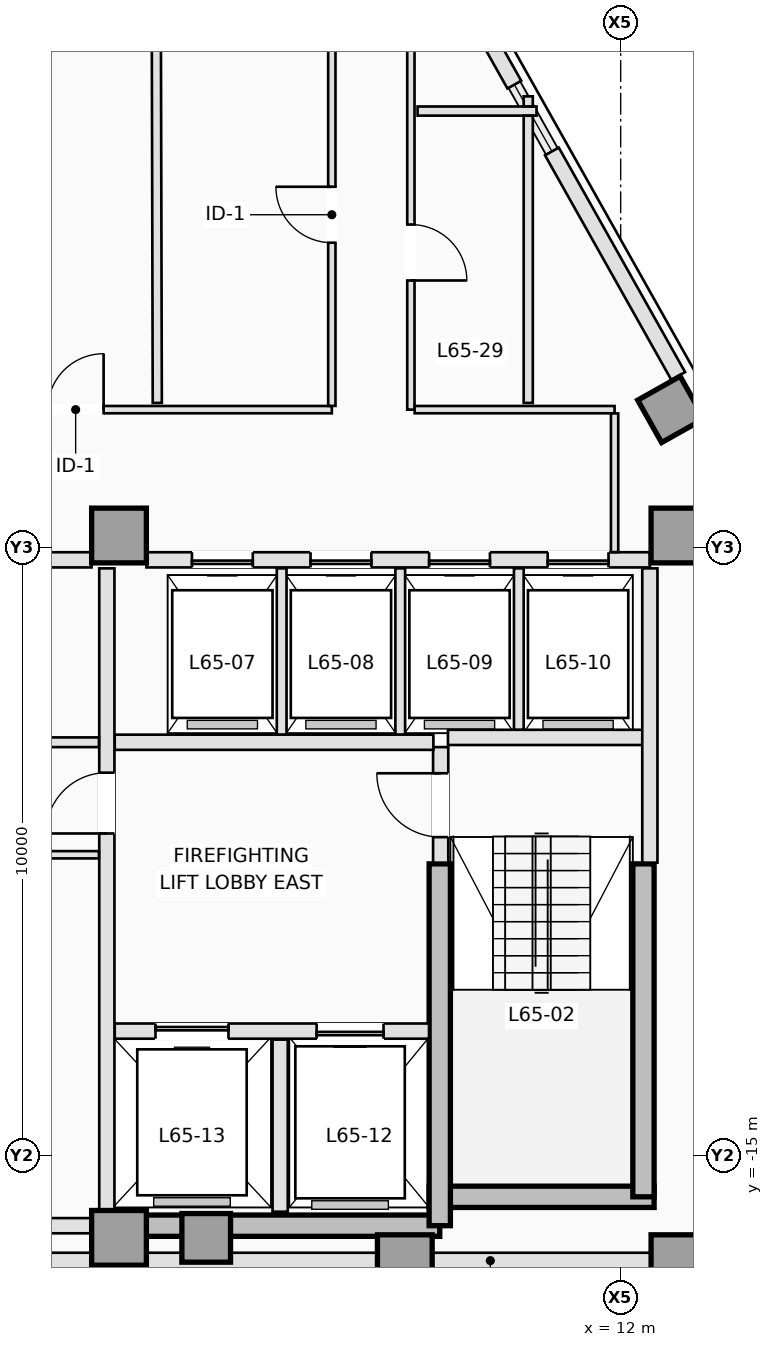
"""IFC4 building model, lengths in metres.
Left out: names, types, materials, properties, quantities, classifications, styles, units other than length and angle.
Written with IfcOpenShell. Run it as: python <this file> out.ifc"""

import sys

from ifc_helpers import new_model, si_unit, direction, frame, frame_2d, origin, origin_2d, place, context, subcontext, project, spatial, rectangle, extrude, element, fill, save


model = new_model("IFC4")
c1 = context("Model", 3, precision=1e-05, world=origin(), true_north=direction((0.0, 1.0)))
c2 = subcontext(c1, "Body", "Model", "MODEL_VIEW")
j1 = project(units=[si_unit("LENGTHUNIT", "METRE"), si_unit("PLANEANGLEUNIT", "RADIAN")], contexts=[c1])
p1 = place(None, origin())
s1 = spatial("IfcSite", under=j1, at=p1, CompositionType="ELEMENT")
p2 = place(p1, origin())
s2 = spatial("IfcBuilding", under=s1, at=p2, CompositionType="ELEMENT")
p3 = place(p2, frame((0.0, 0.0, 235.9)))
s3 = spatial("IfcBuildingStorey", under=s2, at=p3, CompositionType="ELEMENT", Elevation=235.9)
p4 = place(p3, frame((3.75, -16.15, 0.0), z_axis=(0.0, 0.0, 1.0), x_axis=(1.0, 0.0, 0.0)))
e1 = element("IfcWall", 1, at=p4, inside=s3, PredefinedType="SHEAR", context=c2, shape_type="SweptSolid", body=[
    extrude(rectangle(XDim=5.275, YDim=0.35, at=frame_2d((2.637, 0.0))), origin(), (0.0, 0.0, 1.0), 3.5),
])
p5 = place(p3, frame((8.85, -15.675, 0.0), z_axis=(0.0, 0.0, 1.0), x_axis=(1.0, 0.0, 0.0)))
e2 = element("IfcWall", 2, at=p5, inside=s3, PredefinedType="SHEAR", context=c2, shape_type="SweptSolid", body=[
    extrude(rectangle(XDim=3.7, YDim=0.35, at=frame_2d((1.85, 0.0))), origin(), (0.0, 0.0, 1.0), 3.5),
])
p6 = place(p3, frame((12.375, -15.675, 0.0), z_axis=(0.0, 0.0, 1.0), x_axis=(0.0, 1.0, 0.0)))
e3 = element("IfcWall", 3, at=p6, inside=s3, PredefinedType="SHEAR", context=c2, shape_type="SweptSolid", body=[
    extrude(rectangle(XDim=5.475, YDim=0.35, at=frame_2d((2.738, 0.0))), origin(), (0.0, 0.0, 1.0), 3.5),
])
p7 = place(p3, frame((9.025, -16.15, 0.0), z_axis=(0.0, 0.0, 1.0), x_axis=(0.0, 1.0, 0.0)))
e4 = element("IfcWall", 4, at=p7, inside=s3, PredefinedType="SHEAR", context=c2, shape_type="SweptSolid", body=[
    extrude(rectangle(XDim=5.95, YDim=0.35, at=frame_2d((2.975, 0.0))), origin(), (0.0, 0.0, 1.0), 3.5),
])
for number, where, z_axis, x_axis in (
    (5, (3.75, -16.35, 0.0), (0.0, 0.0, 1.0), (1.0, 0.0, 0.0)),
    (6, (8.45, -16.75, 0.0), (0.0, 0.0, 1.0), (1.0, 0.0, 0.0)),
    (7, (12.95, -16.75, 0.0), (0.0, 0.0, 1.0), (1.0, 0.0, 0.0)),
    (8, (3.75, -4.8, 0.0), (0.0, 0.0, 1.0), (1.0, 0.0, 0.0)),
    (9, (12.95, -4.8, 0.0), (0.0, 0.0, 1.0), (1.0, 0.0, 0.0)),
):
    element("IfcColumn", number, at=place(p3, frame(where, z_axis=z_axis, x_axis=x_axis)), inside=s3, PredefinedType="COLUMN", context=c2, shape_type="SweptSolid", body=[
        extrude(rectangle(XDim=0.9, YDim=0.9, at=origin_2d()), origin(), (0.0, 0.0, 1.0), 3.5),
    ])
for number, where, z_axis, x_axis in (
    (10, (5.184, -16.35, 0.0), (0.0, 0.0, 1.0), (0.0, 1.0, 0.0)),
    (11, (12.825, -2.727, 0.0), (0.0, 0.0, 1.0), (0.872, 0.49, 0.0)),
):
    element("IfcColumn", number, at=place(p3, frame(where, z_axis=z_axis, x_axis=x_axis)), inside=s3, PredefinedType="COLUMN", context=c2, shape_type="SweptSolid", body=[
        extrude(rectangle(XDim=0.8, YDim=0.8, at=origin_2d()), origin(), (0.0, 0.0, 1.0), 3.5),
    ])
p8 = place(p3, frame((15.493, -16.725, 0.0), z_axis=(0.0, 0.0, 1.0), x_axis=(-1.0, 0.0, 0.0)))
e12 = element("IfcWall", 12, at=p8, inside=s3, PredefinedType="STANDARD", context=c2, shape_type="SweptSolid", body=[
    extrude(rectangle(XDim=11.273, YDim=0.26, at=frame_2d((5.636, 0.0))), origin(), (0.0, 0.0, 1.0), 2.79),
])
p9 = place(p3, frame((3.28, -16.725, 0.0), z_axis=(0.0, 0.0, 1.0), x_axis=(-1.0, 0.0, 0.0)))
e13 = element("IfcWall", 13, at=p9, inside=s3, PredefinedType="STANDARD", context=c2, shape_type="SweptSolid", body=[
    extrude(rectangle(XDim=2.674, YDim=0.26, at=frame_2d((1.337, 0.0))), origin(), (0.0, 0.0, 1.0), 3.25),
])
p10 = place(p3, frame((8.174, 6.307, 0.0), z_axis=(0.0, 0.0, 1.0), x_axis=(0.490269447258, -0.871570920284, 0.0)))
e14 = element("IfcWall", 14, at=p10, inside=s3, PredefinedType="STANDARD", context=c2, shape_type="SweptSolid", body=[
    extrude(rectangle(XDim=4.237, YDim=0.26, at=frame_2d((2.118, 0.0))), origin(), (0.0, 0.0, 1.0), 3.25),
])
p11 = place(p3, frame((10.869, 1.516, 0.0), z_axis=(0.0, 0.0, 1.0), x_axis=(0.490244825075, -0.871584770109, 0.0)))
e15 = element("IfcWall", 15, at=p11, inside=s3, PredefinedType="STANDARD", context=c2, shape_type="SweptSolid", body=[
    extrude(rectangle(XDim=4.237, YDim=0.26, at=frame_2d((2.119, 0.0))), origin(), (0.0, 0.0, 1.0), 3.25),
])
p12 = place(p3, frame((9.04, -10.18, 0.0), z_axis=(0.0, 0.0, 1.0), x_axis=(0.0, 1.0, 0.0)))
e16 = element("IfcWall", 16, at=p12, inside=s3, PredefinedType="PARTITIONING", context=c2, shape_type="SweptSolid", body=[
    extrude(rectangle(XDim=1.9, YDim=0.25, at=frame_2d((0.95, 0.0))), origin(), (0.0, 0.0, 1.0), 3.25),
])
p13 = place(p12, frame((0.42, 0.0, 0.0)))
e17 = element("IfcOpeningElement", 17, at=p13, cuts=e16, PredefinedType="OPENING", context=c2, shape_type="SweptSolid", body=[
    extrude(rectangle(XDim=1.05, YDim=2.15, at=frame_2d((0.525, 1.075))), frame((0.0, 0.135, 0.0), z_axis=(0.0, -1.0, 0.0), x_axis=(1.0, 0.0, 0.0)), (0.0, 0.0, 1.0), 0.27),
])
p14 = place(p3, frame((9.16, -8.12, 0.0), z_axis=(0.0, 0.0, 1.0), x_axis=(1.0, 0.0, 0.0)))
e18 = element("IfcWall", 18, at=p14, inside=s3, PredefinedType="PARTITIONING", context=c2, shape_type="SweptSolid", body=[
    extrude(rectangle(XDim=3.22, YDim=0.25, at=frame_2d((1.61, 0.0))), origin(), (0.0, 0.0, 1.0), 3.25),
])
p15 = place(p3, frame((12.48, -10.18, 0.0), z_axis=(0.0, 0.0, 1.0), x_axis=(0.0, 1.0, 0.0)))
e19 = element("IfcWall", 19, at=p15, inside=s3, PredefinedType="PARTITIONING", context=c2, shape_type="SweptSolid", body=[
    extrude(rectangle(XDim=4.84, YDim=0.25, at=frame_2d((2.42, 0.0))), origin(), (0.0, 0.0, 1.0), 3.25),
])
p16 = place(p3, frame((3.68, -12.95, 0.0), z_axis=(0.0, 0.0, 1.0), x_axis=(1.0, 0.0, 0.0)))
e20 = element("IfcWall", 20, at=p16, inside=s3, PredefinedType="PARTITIONING", context=c2, shape_type="SweptSolid", body=[
    extrude(rectangle(XDim=5.168, YDim=0.25, at=frame_2d((2.584, 0.0))), origin(), (0.0, 0.0, 1.0), 3.25),
])
p17 = place(p16, frame((3.32, 0.0, 0.0)))
e21 = element("IfcOpeningElement", 21, at=p17, cuts=e20, PredefinedType="OPENING", context=c2, shape_type="SweptSolid", body=[
    extrude(rectangle(XDim=1.1, YDim=2.15, at=frame_2d((0.55, 1.075))), frame((0.0, 0.135, 0.0), z_axis=(0.0, -1.0, 0.0), x_axis=(1.0, 0.0, 0.0)), (0.0, 0.0, 1.0), 0.27),
])
p18 = place(p16, frame((0.67, 0.0, 0.0)))
e22 = element("IfcOpeningElement", 22, at=p18, cuts=e20, PredefinedType="OPENING", context=c2, shape_type="SweptSolid", body=[
    extrude(rectangle(XDim=1.2, YDim=2.15, at=frame_2d((0.6, 1.075))), frame((0.0, 0.135, 0.0), z_axis=(0.0, -1.0, 0.0), x_axis=(1.0, 0.0, 0.0)), (0.0, 0.0, 1.0), 0.27),
])
p19 = place(p3, frame((6.4, -15.92, 0.0), z_axis=(0.0, 0.0, 1.0), x_axis=(0.0, 1.0, 0.0)))
e23 = element("IfcWall", 23, at=p19, inside=s3, PredefinedType="PARTITIONING", context=c2, shape_type="SweptSolid", body=[
    extrude(rectangle(XDim=2.83, YDim=0.25, at=frame_2d((1.415, 0.0))), origin(), (0.0, 0.0, 1.0), 3.25),
])
p20 = place(p3, frame((3.68, -8.2, 0.0), z_axis=(0.0, 0.0, 1.0), x_axis=(1.0, 0.0, 0.0)))
e24 = element("IfcWall", 24, at=p20, inside=s3, PredefinedType="PARTITIONING", context=c2, shape_type="SweptSolid", body=[
    extrude(rectangle(XDim=5.24, YDim=0.25, at=frame_2d((2.62, 0.0))), origin(), (0.0, 0.0, 1.0), 3.25),
])
p21 = place(p3, frame((3.55, -15.898, 0.0), z_axis=(0.0, 0.0, 1.0), x_axis=(0.0, 1.0, 0.0)))
e25 = element("IfcWall", 25, at=p21, inside=s3, PredefinedType="PARTITIONING", context=c2, shape_type="SweptSolid", body=[
    extrude(rectangle(XDim=10.558, YDim=0.25, at=frame_2d((5.279, 0.0))), origin(), (0.0, 0.0, 1.0), 3.25),
])
p22 = place(p21, frame((6.198, 0.0, 0.0)))
e26 = element("IfcOpeningElement", 26, at=p22, cuts=e25, PredefinedType="OPENING", context=c2, shape_type="SweptSolid", body=[
    extrude(rectangle(XDim=1.0, YDim=2.15, at=frame_2d((0.5, 1.075))), frame((0.0, 0.135, 0.0), z_axis=(0.0, -1.0, 0.0), x_axis=(1.0, 0.0, 0.0)), (0.0, 0.0, 1.0), 0.27),
])
p23 = place(p3, frame((4.202, -5.2, 0.0), z_axis=(0.0, 0.0, 1.0), x_axis=(1.0, 0.0, 0.0)))
e27 = element("IfcWall", 27, at=p23, inside=s3, PredefinedType="PARTITIONING", context=c2, shape_type="SweptSolid", body=[
    extrude(rectangle(XDim=8.278, YDim=0.25, at=frame_2d((4.139, 0.0))), origin(), (0.0, 0.0, 1.0), 3.25),
])
p24 = place(p23, frame((0.748, 0.0, 0.0)))
e28 = element("IfcOpeningElement", 28, at=p24, cuts=e27, PredefinedType="OPENING", context=c2, shape_type="SweptSolid", body=[
    extrude(rectangle(XDim=1.0, YDim=2.15, at=frame_2d((0.5, 1.075))), frame((0.0, 0.135, 0.0), z_axis=(0.0, -1.0, 0.0), x_axis=(1.0, 0.0, 0.0)), (0.0, 0.0, 1.0), 0.27),
])
p25 = place(p23, frame((2.698, 0.0, 0.0)))
e29 = element("IfcOpeningElement", 29, at=p25, cuts=e27, PredefinedType="OPENING", context=c2, shape_type="SweptSolid", body=[
    extrude(rectangle(XDim=1.0, YDim=2.15, at=frame_2d((0.5, 1.075))), frame((0.0, 0.135, 0.0), z_axis=(0.0, -1.0, 0.0), x_axis=(1.0, 0.0, 0.0)), (0.0, 0.0, 1.0), 0.27),
])
p26 = place(p23, frame((4.648, 0.0, 0.0)))
e30 = element("IfcOpeningElement", 30, at=p26, cuts=e27, PredefinedType="OPENING", context=c2, shape_type="SweptSolid", body=[
    extrude(rectangle(XDim=1.0, YDim=2.15, at=frame_2d((0.5, 1.075))), frame((0.0, 0.135, 0.0), z_axis=(0.0, -1.0, 0.0), x_axis=(1.0, 0.0, 0.0)), (0.0, 0.0, 1.0), 0.27),
])
p27 = place(p23, frame((6.598, 0.0, 0.0)))
e31 = element("IfcOpeningElement", 31, at=p27, cuts=e27, PredefinedType="OPENING", context=c2, shape_type="SweptSolid", body=[
    extrude(rectangle(XDim=1.0, YDim=2.15, at=frame_2d((0.5, 1.075))), frame((0.0, 0.135, 0.0), z_axis=(0.0, -1.0, 0.0), x_axis=(1.0, 0.0, 0.0)), (0.0, 0.0, 1.0), 0.27),
])
p28 = place(p3, frame((0.95, -5.2, 0.0), z_axis=(0.0, 0.0, 1.0), x_axis=(1.0, 0.0, 0.0)))
e32 = element("IfcWall", 32, at=p28, inside=s3, PredefinedType="PARTITIONING", context=c2, shape_type="SweptSolid", body=[
    extrude(rectangle(XDim=2.348, YDim=0.25, at=frame_2d((1.174, 0.0))), origin(), (0.0, 0.0, 1.0), 3.25),
])
for number, where, z_axis, x_axis in (
    (33, (6.425, -8.073, 0.0), (0.0, 0.0, 1.0), (0.0, 1.0, 0.0)),
    (34, (8.375, -8.073, 0.0), (0.0, 0.0, 1.0), (0.0, 1.0, 0.0)),
):
    element("IfcWall", number, at=place(p3, frame(where, z_axis=z_axis, x_axis=x_axis)), inside=s3, PredefinedType="PARTITIONING", context=c2, shape_type="SweptSolid", body=[
        extrude(rectangle(XDim=2.733, YDim=0.16, at=frame_2d((1.366, 0.0))), origin(), (0.0, 0.0, 1.0), 3.25),
    ])
p29 = place(p3, frame((10.325, -7.993, 0.0), z_axis=(0.0, 0.0, 1.0), x_axis=(0.0, 1.0, 0.0)))
e35 = element("IfcWall", 35, at=p29, inside=s3, PredefinedType="PARTITIONING", context=c2, shape_type="SweptSolid", body=[
    extrude(rectangle(XDim=2.653, YDim=0.16, at=frame_2d((1.326, 0.0))), origin(), (0.0, 0.0, 1.0), 3.25),
])
p30 = place(p3, frame((-3.298, -16.15, 0.0), z_axis=(0.0, 0.0, 1.0), x_axis=(1.0, 0.0, 0.0)))
e36 = element("IfcWall", 36, at=p30, inside=s3, PredefinedType="PARTITIONING", context=c2, shape_type="SweptSolid", body=[
    extrude(rectangle(XDim=6.596, YDim=0.25, at=frame_2d((3.298, 0.0))), origin(), (0.0, 0.0, 1.0), 2.844),
])
p31 = place(p3, frame((-3.42, -8.2, 0.0), z_axis=(0.0, 0.0, 1.0), x_axis=(1.0, 0.0, 0.0)))
e37 = element("IfcWall", 37, at=p31, inside=s3, PredefinedType="PARTITIONING", context=c2, shape_type="SweptSolid", body=[
    extrude(rectangle(XDim=6.84, YDim=0.16, at=frame_2d((3.42, 0.0))), origin(), (0.0, 0.0, 1.0), 3.25),
])
p32 = place(p31, frame((2.92, 0.0, 0.0)))
e38 = element("IfcOpeningElement", 38, at=p32, cuts=e37, PredefinedType="OPENING", context=c2, shape_type="SweptSolid", body=[
    extrude(rectangle(XDim=1.0, YDim=2.15, at=frame_2d((0.5, 1.075))), frame((0.0, 0.09, 0.0), z_axis=(0.0, -1.0, 0.0), x_axis=(1.0, 0.0, 0.0)), (0.0, 0.0, 1.0), 0.18),
])
p33 = place(p3, frame((-3.42, -10.05, 0.0), z_axis=(0.0, 0.0, 1.0), x_axis=(1.0, 0.0, 0.0)))
e39 = element("IfcWall", 39, at=p33, inside=s3, PredefinedType="PARTITIONING", context=c2, shape_type="SweptSolid", body=[
    extrude(rectangle(XDim=6.84, YDim=0.12, at=frame_2d((3.42, 0.0))), origin(), (0.0, 0.0, 1.0), 3.25),
])
p34 = place(p33, frame((0.45, 0.0, 0.0)))
e40 = element("IfcOpeningElement", 40, at=p34, cuts=e39, PredefinedType="OPENING", context=c2, shape_type="SweptSolid", body=[
    extrude(rectangle(XDim=0.88, YDim=2.12, at=frame_2d((0.44, 1.06))), frame((0.0, 0.07, 0.0), z_axis=(0.0, -1.0, 0.0), x_axis=(1.0, 0.0, 0.0)), (0.0, 0.0, 1.0), 0.14),
])
p35 = place(p33, frame((3.6, 0.0, 0.0)))
e41 = element("IfcOpeningElement", 41, at=p35, cuts=e39, PredefinedType="OPENING", context=c2, shape_type="SweptSolid", body=[
    extrude(rectangle(XDim=0.92, YDim=2.12, at=frame_2d((0.46, 1.06))), frame((0.0, 0.07, 0.0), z_axis=(0.0, -1.0, 0.0), x_axis=(1.0, 0.0, 0.0)), (0.0, 0.0, 1.0), 0.14),
])
p36 = place(p3, frame((-1.178, -2.73, 0.0), z_axis=(0.0, 0.0, 1.0), x_axis=(1.0, 0.0, 0.0)))
e42 = element("IfcWall", 42, at=p36, inside=s3, PredefinedType="PARTITIONING", context=c2, shape_type="SweptSolid", body=[
    extrude(rectangle(XDim=8.428, YDim=0.12, at=frame_2d((4.214, 0.0))), origin(), (0.0, 0.0, 1.0), 2.943),
])
p37 = place(p36, frame((1.08, 0.0, 0.0)))
e43 = element("IfcOpeningElement", 43, at=p37, cuts=e42, PredefinedType="OPENING", context=c2, shape_type="SweptSolid", body=[
    extrude(rectangle(XDim=0.92, YDim=2.12, at=frame_2d((0.46, 1.06))), frame((0.0, 0.07, 0.0), z_axis=(0.0, -1.0, 0.0), x_axis=(1.0, 0.0, 0.0)), (0.0, 0.0, 1.0), 0.14),
])
p38 = place(p36, frame((3.755, 0.0, 0.0)))
e44 = element("IfcOpeningElement", 44, at=p38, cuts=e42, PredefinedType="OPENING", context=c2, shape_type="SweptSolid", body=[
    extrude(rectangle(XDim=0.92, YDim=2.12, at=frame_2d((0.46, 1.06))), frame((0.0, 0.07, 0.0), z_axis=(0.0, -1.0, 0.0), x_axis=(1.0, 0.0, 0.0)), (0.0, 0.0, 1.0), 0.14),
])
p39 = place(p3, frame((7.25, -2.668, 0.0), z_axis=(0.0, 0.0, 1.0), x_axis=(0.0, 1.0, 0.0)))
e45 = element("IfcWall", 45, at=p39, inside=s3, PredefinedType="PARTITIONING", context=c2, shape_type="SweptSolid", body=[
    extrude(rectangle(XDim=6.348, YDim=0.12, at=frame_2d((3.174, 0.0))), origin(), (0.0, 0.0, 1.0), 3.25),
])
p40 = place(p39, frame((2.683, 0.0, 0.0)))
e46 = element("IfcOpeningElement", 46, at=p40, cuts=e45, PredefinedType="OPENING", context=c2, shape_type="SweptSolid", body=[
    extrude(rectangle(XDim=0.92, YDim=2.12, at=frame_2d((0.46, 1.06))), frame((0.0, 0.07, 0.0), z_axis=(0.0, -1.0, 0.0), x_axis=(1.0, 0.0, 0.0)), (0.0, 0.0, 1.0), 0.14),
])
p41 = place(p3, frame((8.55, 3.365, 0.0), z_axis=(0.0, 0.0, 1.0), x_axis=(0.0, -1.0, 0.0)))
e47 = element("IfcWall", 47, at=p41, inside=s3, PredefinedType="PARTITIONING", context=c2, shape_type="SweptSolid", body=[
    extrude(rectangle(XDim=6.095, YDim=0.12, at=frame_2d((3.047, 0.0))), origin(), (0.0, 0.0, 1.0), 3.25),
])
p42 = place(p41, frame((3.051, 0.0, 0.0)))
e48 = element("IfcOpeningElement", 48, at=p42, cuts=e47, PredefinedType="OPENING", context=c2, shape_type="SweptSolid", body=[
    extrude(rectangle(XDim=0.92, YDim=2.12, at=frame_2d((0.46, 1.06))), frame((0.0, 0.07, 0.0), z_axis=(0.0, -1.0, 0.0), x_axis=(1.0, 0.0, 0.0)), (0.0, 0.0, 1.0), 0.14),
])
p43 = place(p3, frame((8.612, -2.73, 0.0), z_axis=(0.0, 0.0, 1.0), x_axis=(1.0, 0.0, 0.0)))
e49 = element("IfcWall", 49, at=p43, inside=s3, PredefinedType="PARTITIONING", context=c2, shape_type="SweptSolid", body=[
    extrude(rectangle(XDim=3.288, YDim=0.12, at=frame_2d((1.644, 0.0))), origin(), (0.0, 0.0, 1.0), 3.25),
])
p44 = place(p3, frame((11.9, -2.792, 0.0), z_axis=(0.0, 0.0, 1.0), x_axis=(0.0, -1.0, 0.0)))
e50 = element("IfcWall", 50, at=p44, inside=s3, PredefinedType="PARTITIONING", context=c2, shape_type="SweptSolid", body=[
    extrude(rectangle(XDim=2.281, YDim=0.12, at=frame_2d((1.141, 0.0))), origin(), (0.0, 0.0, 1.0), 3.25),
])
p45 = place(p3, frame((4.341, 12.853, 0.0), z_axis=(0.0, 0.0, 1.0), x_axis=(0.002508749087, -0.999996853084, 0.0)))
e51 = element("IfcWall", 51, at=p45, inside=s3, PredefinedType="PARTITIONING", context=c2, shape_type="SweptSolid", body=[
    extrude(rectangle(XDim=15.473, YDim=0.15, at=frame_2d((7.737, 0.0))), origin(), (0.0, 0.0, 1.0), 3.25),
])
p46 = place(p3, frame((10.616, 2.18, 0.0), z_axis=(0.0, 0.0, 1.0), x_axis=(-1.0, 0.0, 0.0)))
e52 = element("IfcWall", 52, at=p46, inside=s3, PredefinedType="PARTITIONING", context=c2, shape_type="SweptSolid", body=[
    extrude(rectangle(XDim=1.956, YDim=0.15, at=frame_2d((0.978, 0.0))), origin(), (0.0, 0.0, 1.0), 3.25),
])
p47 = place(p3, frame((10.48, 2.422, 0.0), z_axis=(0.0, 0.0, 1.0), x_axis=(0.0, -1.0, 0.0)))
e53 = element("IfcWall", 53, at=p47, inside=s3, PredefinedType="PARTITIONING", context=c2, shape_type="SweptSolid", body=[
    extrude(rectangle(XDim=0.165, YDim=0.15, at=frame_2d((0.083, 0.0))), origin(), (0.0, 0.0, 1.0), 3.25),
])
p48 = place(p3, frame((10.48, 2.103, 0.0), z_axis=(0.0, 0.0, 1.0), x_axis=(0.0, -1.0, 0.0)))
e54 = element("IfcWall", 54, at=p48, inside=s3, PredefinedType="PARTITIONING", context=c2, shape_type="SweptSolid", body=[
    extrude(rectangle(XDim=4.723, YDim=0.15, at=frame_2d((2.362, 0.0))), origin(), (0.0, 0.0, 1.0), 3.25),
])
p49 = place(p24, origin())
e55 = element("IfcDoor", 55, at=p49, inside=s3, OperationType="SLIDING_TO_RIGHT", PredefinedType="DOOR", context=c2, shape_type="SweptSolid", body=[
    extrude(rectangle(XDim=1.0, YDim=2.15, at=frame_2d((0.5, 1.075))), frame((0.0, 0.025, 0.0), z_axis=(0.0, -1.0, 0.0), x_axis=(1.0, 0.0, 0.0)), (0.0, 0.0, 1.0), 0.05),
])
fill(e28, e55)
p50 = place(p25, origin())
e56 = element("IfcDoor", 56, at=p50, inside=s3, OperationType="SLIDING_TO_RIGHT", PredefinedType="DOOR", context=c2, shape_type="SweptSolid", body=[
    extrude(rectangle(XDim=1.0, YDim=2.15, at=frame_2d((0.5, 1.075))), frame((0.0, 0.025, 0.0), z_axis=(0.0, -1.0, 0.0), x_axis=(1.0, 0.0, 0.0)), (0.0, 0.0, 1.0), 0.05),
])
fill(e29, e56)
p51 = place(p26, origin())
e57 = element("IfcDoor", 57, at=p51, inside=s3, OperationType="SLIDING_TO_RIGHT", PredefinedType="DOOR", context=c2, shape_type="SweptSolid", body=[
    extrude(rectangle(XDim=1.0, YDim=2.15, at=frame_2d((0.5, 1.075))), frame((0.0, 0.025, 0.0), z_axis=(0.0, -1.0, 0.0), x_axis=(1.0, 0.0, 0.0)), (0.0, 0.0, 1.0), 0.05),
])
fill(e30, e57)
p52 = place(p27, origin())
e58 = element("IfcDoor", 58, at=p52, inside=s3, OperationType="SLIDING_TO_RIGHT", PredefinedType="DOOR", context=c2, shape_type="SweptSolid", body=[
    extrude(rectangle(XDim=1.0, YDim=2.15, at=frame_2d((0.5, 1.075))), frame((0.0, 0.025, 0.0), z_axis=(0.0, -1.0, 0.0), x_axis=(1.0, 0.0, 0.0)), (0.0, 0.0, 1.0), 0.05),
])
fill(e31, e58)
p53 = place(p17, origin())
e59 = element("IfcDoor", 59, at=p53, inside=s3, OperationType="SLIDING_TO_RIGHT", PredefinedType="DOOR", context=c2, shape_type="SweptSolid", body=[
    extrude(rectangle(XDim=1.1, YDim=2.15, at=frame_2d((0.55, 1.075))), frame((0.0, 0.025, 0.0), z_axis=(0.0, -1.0, 0.0), x_axis=(1.0, 0.0, 0.0)), (0.0, 0.0, 1.0), 0.05),
])
fill(e21, e59)
p54 = place(p18, origin())
e60 = element("IfcDoor", 60, at=p54, inside=s3, OperationType="SLIDING_TO_LEFT", PredefinedType="DOOR", context=c2, shape_type="SweptSolid", body=[
    extrude(rectangle(XDim=1.2, YDim=2.15, at=frame_2d((0.6, 1.075))), frame((0.0, 0.025, 0.0), z_axis=(0.0, -1.0, 0.0), x_axis=(1.0, 0.0, 0.0)), (0.0, 0.0, 1.0), 0.05),
])
fill(e22, e60)
p55 = place(p13, origin())
e61 = element("IfcDoor", 61, at=p55, inside=s3, OperationType="SINGLE_SWING_RIGHT", PredefinedType="DOOR", context=c2, shape_type="SweptSolid", body=[
    extrude(rectangle(XDim=1.05, YDim=2.15, at=frame_2d((0.525, 1.075))), frame((0.0, 0.025, 0.0), z_axis=(0.0, -1.0, 0.0), x_axis=(1.0, 0.0, 0.0)), (0.0, 0.0, 1.0), 0.05),
])
fill(e17, e61)
p56 = place(p22, origin())
e62 = element("IfcDoor", 62, at=p56, inside=s3, OperationType="SINGLE_SWING_LEFT", PredefinedType="DOOR", context=c2, shape_type="SweptSolid", body=[
    extrude(rectangle(XDim=1.0, YDim=2.15, at=frame_2d((0.5, 1.075))), frame((0.0, 0.025, 0.0), z_axis=(0.0, -1.0, 0.0), x_axis=(1.0, 0.0, 0.0)), (0.0, 0.0, 1.0), 0.05),
])
fill(e26, e62)
p57 = place(p38, origin())
e63 = element("IfcDoor", 63, at=p57, inside=s3, OperationType="SINGLE_SWING_RIGHT", PredefinedType="DOOR", context=c2, shape_type="SweptSolid", body=[
    extrude(rectangle(XDim=0.92, YDim=2.12, at=frame_2d((0.46, 1.06))), frame((0.0, 0.025, 0.0), z_axis=(0.0, -1.0, 0.0), x_axis=(1.0, 0.0, 0.0)), (0.0, 0.0, 1.0), 0.05),
])
fill(e44, e63)
p58 = place(p40, origin())
e64 = element("IfcDoor", 64, at=p58, inside=s3, OperationType="SINGLE_SWING_RIGHT", PredefinedType="DOOR", context=c2, shape_type="SweptSolid", body=[
    extrude(rectangle(XDim=0.92, YDim=2.12, at=frame_2d((0.46, 1.06))), frame((0.0, 0.025, 0.0), z_axis=(0.0, -1.0, 0.0), x_axis=(1.0, 0.0, 0.0)), (0.0, 0.0, 1.0), 0.05),
])
fill(e46, e64)
p59 = place(p42, origin())
e65 = element("IfcDoor", 65, at=p59, inside=s3, OperationType="SINGLE_SWING_RIGHT", PredefinedType="DOOR", context=c2, shape_type="SweptSolid", body=[
    extrude(rectangle(XDim=0.92, YDim=2.12, at=frame_2d((0.46, 1.06))), frame((0.0, 0.025, 0.0), z_axis=(0.0, -1.0, 0.0), x_axis=(1.0, 0.0, 0.0)), (0.0, 0.0, 1.0), 0.05),
])
fill(e48, e65)
save(model, sys.argv[1])
